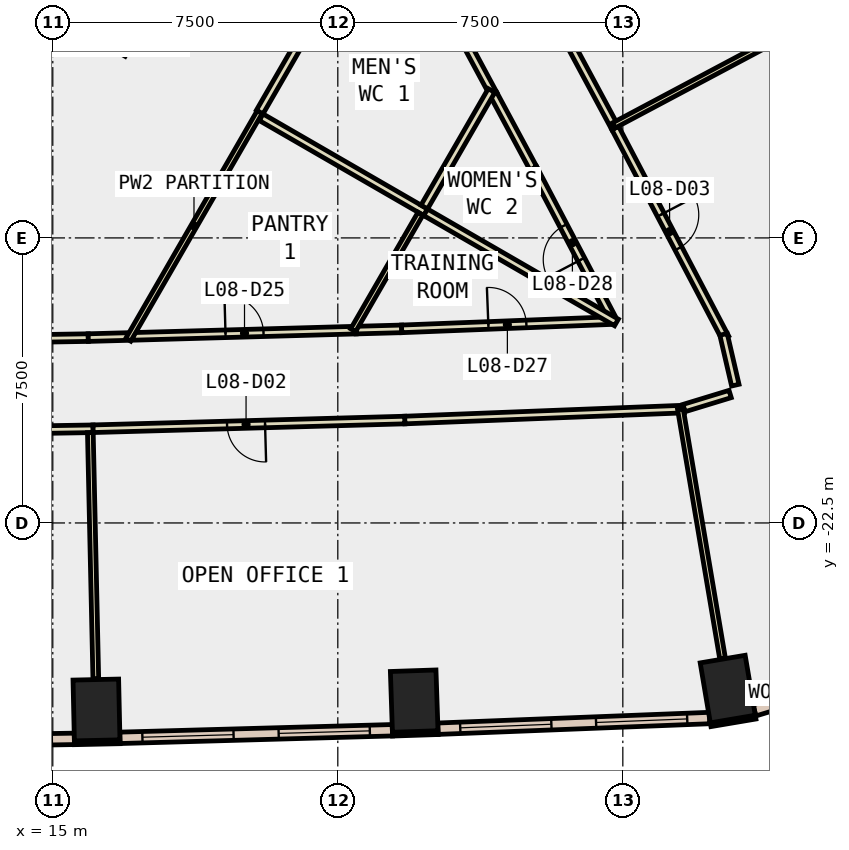
"""IFC4 building model, lengths in metres.
Left out: names, types, materials, properties, quantities, classifications, styles, units other than length and angle.
Written with IfcOpenShell. Run it as: python <this file> out.ifc"""

import sys

from ifc_helpers import new_model, si_unit, direction, frame, frame_2d, origin, origin_2d, place, context, subcontext, project, spatial, rectangle, extrude, element, fill, save


model = new_model("IFC4")
c1 = context("Model", 3, precision=1e-05, world=origin(), true_north=direction((0.0, 1.0)))
c2 = subcontext(c1, "Body", "Model", "MODEL_VIEW")
j1 = project(units=[si_unit("LENGTHUNIT", "METRE"), si_unit("PLANEANGLEUNIT", "RADIAN")], contexts=[c1])
p1 = place(None, origin())
s1 = spatial("IfcSite", under=j1, at=p1, CompositionType="ELEMENT")
p2 = place(p1, origin())
s2 = spatial("IfcBuilding", under=s1, at=p2, CompositionType="ELEMENT")
p3 = place(p2, frame((0.0, 0.0, 43.4)))
s3 = spatial("IfcBuildingStorey", under=s2, at=p3, CompositionType="ELEMENT", Elevation=43.4)
for number, where, z_axis, x_axis in (
    (1, (16.15, -27.421, -0.4), (0.0, 0.0, 1.0), (1.0, 0.022, 0.0)),
    (2, (24.51, -27.188, -0.4), (0.0, 0.0, 1.0), (0.999, 0.034, 0.0)),
    (3, (32.761, -26.871, -0.4), (0.0, 0.0, 1.0), (0.986, 0.167, 0.0)),
):
    element("IfcColumn", number, at=place(p3, frame(where, z_axis=z_axis, x_axis=x_axis)), inside=s3, PredefinedType="COLUMN", context=c2, shape_type="SweptSolid", body=[
        extrude(rectangle(XDim=1.2, YDim=1.6, at=origin_2d()), origin(), (0.0, 0.0, 1.0), 4.2),
    ])
p4 = place(p3, frame((9.31, -5.375, -0.4), z_axis=(0.0, 0.0, 1.0), x_axis=(0.866017533419, -0.500013631625, 0.0)))
e4 = element("IfcWall", 4, at=p4, inside=s3, PredefinedType="SHEAR", context=c2, shape_type="SweptSolid", body=[
    extrude(rectangle(XDim=9.0, YDim=0.8, at=frame_2d((4.5, 0.0))), origin(), (0.0, 0.0, 1.0), 4.2),
])
p5 = place(p3, frame((15.569, -28.284, 0.0), z_axis=(0.0, 0.0, 1.0), x_axis=(0.99976752127, 0.021561618973, 0.0)))
e5 = element("IfcWall", 5, at=p5, inside=s3, PredefinedType="STANDARD", context=c2, shape_type="SweptSolid", body=[
    extrude(rectangle(XDim=1.2, YDim=0.1, at=frame_2d((0.6, 0.0))), origin(), (0.0, 0.0, 1.0), 3.8),
])
for number, where, z_axis, x_axis in (
    (6, (23.939, -28.057, 0.0), (0.0, 0.0, 1.0), (0.999, 0.033, 0.0)),
    (7, (32.311, -27.809, 0.0), (0.0, 0.0, 1.0), (0.986, 0.167, 0.0)),
):
    element("IfcWall", number, at=place(p3, frame(where, z_axis=z_axis, x_axis=x_axis)), inside=s3, PredefinedType="STANDARD", context=c2, shape_type="SweptSolid", body=[
        extrude(rectangle(XDim=1.2, YDim=0.1, at=frame_2d((0.6, 0.0))), origin(), (0.0, 0.0, 1.0), 3.8),
    ])
p6 = place(p3, frame((8.398, -28.298, 0.0), z_axis=(0.0, 0.0, 1.0), x_axis=(0.999866467443, 0.016341581408, 0.0)))
e8 = element("IfcWall", 8, at=p6, inside=s3, PredefinedType="STANDARD", context=c2, shape_type="SweptSolid", body=[
    extrude(rectangle(XDim=7.171, YDim=0.3, at=frame_2d((3.585, 0.0))), origin(), (0.0, 0.0, 1.0), 3.8),
])
p7 = place(p6, frame((0.593, 0.0, 0.9)))
e9 = element("IfcOpeningElement", 9, at=p7, cuts=e8, PredefinedType="OPENING", context=c2, shape_type="SweptSolid", body=[
    extrude(rectangle(XDim=2.4, YDim=2.6, at=frame_2d((1.2, 1.3))), frame((0.0, 0.16, 0.0), z_axis=(0.0, -1.0, 0.0), x_axis=(1.0, 0.0, 0.0)), (0.0, 0.0, 1.0), 0.32),
])
p8 = place(p6, frame((4.178, 0.0, 0.9)))
e10 = element("IfcOpeningElement", 10, at=p8, cuts=e8, PredefinedType="OPENING", context=c2, shape_type="SweptSolid", body=[
    extrude(rectangle(XDim=2.4, YDim=2.6, at=frame_2d((1.2, 1.3))), frame((0.0, 0.16, 0.0), z_axis=(0.0, -1.0, 0.0), x_axis=(1.0, 0.0, 0.0)), (0.0, 0.0, 1.0), 0.32),
])
p9 = place(p3, frame((16.765, -28.154, 0.0), z_axis=(0.0, 0.0, 1.0), x_axis=(0.999611502654, 0.02787191709, 0.0)))
e11 = element("IfcWall", 11, at=p9, inside=s3, PredefinedType="STANDARD", context=c2, shape_type="SweptSolid", body=[
    extrude(rectangle(XDim=7.174, YDim=0.3, at=frame_2d((3.587, 0.0))), origin(), (0.0, 0.0, 1.0), 3.8),
])
p10 = place(p9, frame((0.593, 0.0, 0.9)))
e12 = element("IfcOpeningElement", 12, at=p10, cuts=e11, PredefinedType="OPENING", context=c2, shape_type="SweptSolid", body=[
    extrude(rectangle(XDim=2.4, YDim=2.6, at=frame_2d((1.2, 1.3))), frame((0.0, 0.16, 0.0), z_axis=(0.0, -1.0, 0.0), x_axis=(1.0, 0.0, 0.0)), (0.0, 0.0, 1.0), 0.32),
])
p11 = place(p9, frame((4.18, 0.0, 0.9)))
e13 = element("IfcOpeningElement", 13, at=p11, cuts=e11, PredefinedType="OPENING", context=c2, shape_type="SweptSolid", body=[
    extrude(rectangle(XDim=2.4, YDim=2.6, at=frame_2d((1.2, 1.3))), frame((0.0, 0.16, 0.0), z_axis=(0.0, -1.0, 0.0), x_axis=(1.0, 0.0, 0.0)), (0.0, 0.0, 1.0), 0.32),
])
p12 = place(p3, frame((25.134, -27.914, 0.0), z_axis=(0.0, 0.0, 1.0), x_axis=(0.999228146648, 0.039282450878, 0.0)))
e14 = element("IfcWall", 14, at=p12, inside=s3, PredefinedType="STANDARD", context=c2, shape_type="SweptSolid", body=[
    extrude(rectangle(XDim=7.154, YDim=0.3, at=frame_2d((3.577, 0.0))), origin(), (0.0, 0.0, 1.0), 3.8),
])
p13 = place(p12, frame((0.588, 0.0, 0.9)))
e15 = element("IfcOpeningElement", 15, at=p13, cuts=e14, PredefinedType="OPENING", context=c2, shape_type="SweptSolid", body=[
    extrude(rectangle(XDim=2.4, YDim=2.6, at=frame_2d((1.2, 1.3))), frame((0.0, 0.16, 0.0), z_axis=(0.0, -1.0, 0.0), x_axis=(1.0, 0.0, 0.0)), (0.0, 0.0, 1.0), 0.32),
])
p14 = place(p12, frame((4.165, 0.0, 0.9)))
e16 = element("IfcOpeningElement", 16, at=p14, cuts=e14, PredefinedType="OPENING", context=c2, shape_type="SweptSolid", body=[
    extrude(rectangle(XDim=2.4, YDim=2.6, at=frame_2d((1.2, 1.3))), frame((0.0, 0.16, 0.0), z_axis=(0.0, -1.0, 0.0), x_axis=(1.0, 0.0, 0.0)), (0.0, 0.0, 1.0), 0.32),
])
p15 = place(p3, frame((33.464, -27.433, 0.0), z_axis=(0.0, 0.0, 1.0), x_axis=(0.95648967224, 0.291766185322, 0.0)))
e17 = element("IfcWall", 17, at=p15, inside=s3, PredefinedType="STANDARD", context=c2, shape_type="SweptSolid", body=[
    extrude(rectangle(XDim=3.181, YDim=0.3, at=frame_2d((1.591, 0.0))), origin(), (0.0, 0.0, 1.0), 3.8),
])
p16 = place(p15, frame((0.891, 0.0, 0.9)))
e18 = element("IfcOpeningElement", 18, at=p16, cuts=e17, PredefinedType="OPENING", context=c2, shape_type="SweptSolid", body=[
    extrude(rectangle(XDim=1.4, YDim=2.6, at=frame_2d((0.7, 1.3))), frame((0.0, 0.16, 0.0), z_axis=(0.0, -1.0, 0.0), x_axis=(1.0, 0.0, 0.0)), (0.0, 0.0, 1.0), 0.32),
])
p17 = place(p3, frame((7.7, -17.758, 0.0), z_axis=(0.0, 0.0, 1.0), x_axis=(0.999865574926, 0.016396099485, 0.0)))
e19 = element("IfcWall", 19, at=p17, inside=s3, PredefinedType="PARTITIONING", context=c2, shape_type="SweptSolid", body=[
    extrude(rectangle(XDim=8.234, YDim=0.2, at=frame_2d((4.117, 0.0))), origin(), (0.0, 0.0, 1.0), 3.8),
])
p18 = place(p3, frame((15.933, -17.623, 0.0), z_axis=(0.0, 0.0, 1.0), x_axis=(0.999627129061, 0.027305729179, 0.0)))
e20 = element("IfcWall", 20, at=p18, inside=s3, PredefinedType="PARTITIONING", context=c2, shape_type="SweptSolid", body=[
    extrude(rectangle(XDim=1.028, YDim=0.2, at=frame_2d((0.514, 0.0))), origin(), (0.0, 0.0, 1.0), 3.8),
])
p19 = place(p3, frame((17.111, -17.591, 0.0), z_axis=(0.0, 0.0, 1.0), x_axis=(0.99960470841, 0.028114532261, 0.0)))
e21 = element("IfcWall", 21, at=p19, inside=s3, PredefinedType="PARTITIONING", context=c2, shape_type="SweptSolid", body=[
    extrude(rectangle(XDim=5.87, YDim=0.2, at=frame_2d((2.935, 0.0))), origin(), (0.0, 0.0, 1.0), 3.8),
])
p20 = place(p19, frame((2.435, 0.0, 0.0)))
e22 = element("IfcOpeningElement", 22, at=p20, cuts=e21, PredefinedType="OPENING", context=c2, shape_type="SweptSolid", body=[
    extrude(rectangle(XDim=1.0, YDim=2.1, at=frame_2d((0.5, 1.05))), frame((0.0, 0.11, 0.0), z_axis=(0.0, -1.0, 0.0), x_axis=(1.0, 0.0, 0.0)), (0.0, 0.0, 1.0), 0.22),
])
p21 = place(p3, frame((26.592, -11.211, 0.0), z_axis=(0.0, 0.0, 1.0), x_axis=(-0.473737860011, 0.880665907136, 0.0)))
e23 = element("IfcWall", 23, at=p21, inside=s3, PredefinedType="PARTITIONING", context=c2, shape_type="SweptSolid", body=[
    extrude(rectangle(XDim=4.988, YDim=0.2, at=frame_2d((2.494, 0.0))), origin(), (0.0, 0.0, 1.0), 3.8),
])
p22 = place(p21, frame((1.994, 0.0, 0.0)))
e24 = element("IfcOpeningElement", 24, at=p22, cuts=e23, PredefinedType="OPENING", context=c2, shape_type="SweptSolid", body=[
    extrude(rectangle(XDim=1.0, YDim=2.1, at=frame_2d((0.5, 1.05))), frame((0.0, 0.11, 0.0), z_axis=(0.0, -1.0, 0.0), x_axis=(1.0, 0.0, 0.0)), (0.0, 0.0, 1.0), 0.22),
])
p23 = place(p3, frame((22.979, -17.426, 0.0), z_axis=(0.0, 0.0, 1.0), x_axis=(0.999623609507, 0.027434272674, 0.0)))
e25 = element("IfcWall", 25, at=p23, inside=s3, PredefinedType="PARTITIONING", context=c2, shape_type="SweptSolid", body=[
    extrude(rectangle(XDim=1.201, YDim=0.2, at=frame_2d((0.601, 0.0))), origin(), (0.0, 0.0, 1.0), 3.8),
])
p24 = place(p3, frame((24.18, -17.393, 0.0), z_axis=(0.0, 0.0, 1.0), x_axis=(0.999226657848, 0.039320303228, 0.0)))
e26 = element("IfcWall", 26, at=p24, inside=s3, PredefinedType="PARTITIONING", context=c2, shape_type="SweptSolid", body=[
    extrude(rectangle(XDim=5.57, YDim=0.2, at=frame_2d((2.785, 0.0))), origin(), (0.0, 0.0, 1.0), 3.8),
])
p25 = place(p24, frame((2.284, 0.0, 0.0)))
e27 = element("IfcOpeningElement", 27, at=p25, cuts=e26, PredefinedType="OPENING", context=c2, shape_type="SweptSolid", body=[
    extrude(rectangle(XDim=1.0, YDim=2.1, at=frame_2d((0.5, 1.05))), frame((0.0, 0.11, 0.0), z_axis=(0.0, -1.0, 0.0), x_axis=(1.0, 0.0, 0.0)), (0.0, 0.0, 1.0), 0.22),
])
p26 = place(p3, frame((29.702, -17.085, 0.0), z_axis=(0.0, 0.0, 1.0), x_axis=(-0.464998228159, 0.88531161057, 0.0)))
e28 = element("IfcWall", 28, at=p26, inside=s3, PredefinedType="PARTITIONING", context=c2, shape_type="SweptSolid", body=[
    extrude(rectangle(XDim=4.426, YDim=0.2, at=frame_2d((2.213, 0.0))), origin(), (0.0, 0.0, 1.0), 3.8),
])
p27 = place(p26, frame((1.713, 0.0, 0.0)))
e29 = element("IfcOpeningElement", 29, at=p27, cuts=e28, PredefinedType="OPENING", context=c2, shape_type="SweptSolid", body=[
    extrude(rectangle(XDim=1.0, YDim=2.1, at=frame_2d((0.5, 1.05))), frame((0.0, 0.11, 0.0), z_axis=(0.0, -1.0, 0.0), x_axis=(1.0, 0.0, 0.0)), (0.0, 0.0, 1.0), 0.22),
])
p28 = place(p3, frame((27.644, -13.167, 0.0), z_axis=(0.0, 0.0, 1.0), x_axis=(-0.473660574093, 0.880707477287, 0.0)))
e30 = element("IfcWall", 30, at=p28, inside=s3, PredefinedType="PARTITIONING", context=c2, shape_type="SweptSolid", body=[
    extrude(rectangle(XDim=2.221, YDim=0.2, at=frame_2d((1.11, 0.0))), origin(), (0.0, 0.0, 1.0), 3.8),
])
p29 = place(p3, frame((16.061, -20.022, 0.0), z_axis=(0.0, 0.0, 1.0), x_axis=(-0.999865858466, -0.016378799504, 0.0)))
e31 = element("IfcWall", 31, at=p29, inside=s3, PredefinedType="PARTITIONING", context=c2, shape_type="SweptSolid", body=[
    extrude(rectangle(XDim=8.362, YDim=0.2, at=frame_2d((4.181, 0.0))), origin(), (0.0, 0.0, 1.0), 3.8),
])
p30 = place(p29, frame((3.681, 0.0, 0.0)))
e32 = element("IfcOpeningElement", 32, at=p30, cuts=e31, PredefinedType="OPENING", context=c2, shape_type="SweptSolid", body=[
    extrude(rectangle(XDim=1.0, YDim=2.1, at=frame_2d((0.5, 1.05))), frame((0.0, 0.11, 0.0), z_axis=(0.0, -1.0, 0.0), x_axis=(1.0, 0.0, 0.0)), (0.0, 0.0, 1.0), 0.22),
])
p31 = place(p3, frame((31.615, -19.503, 0.0), z_axis=(0.0, 0.0, 1.0), x_axis=(-0.999228381006, -0.039276489048, 0.0)))
e33 = element("IfcWall", 33, at=p31, inside=s3, PredefinedType="PARTITIONING", context=c2, shape_type="SweptSolid", body=[
    extrude(rectangle(XDim=7.36, YDim=0.2, at=frame_2d((3.68, 0.0))), origin(), (0.0, 0.0, 1.0), 3.8),
])
p32 = place(p3, frame((24.261, -19.792, 0.0), z_axis=(0.0, 0.0, 1.0), x_axis=(-0.999610256124, -0.027916587377, 0.0)))
e34 = element("IfcWall", 34, at=p32, inside=s3, PredefinedType="PARTITIONING", context=c2, shape_type="SweptSolid", body=[
    extrude(rectangle(XDim=8.203, YDim=0.2, at=frame_2d((4.102, 0.0))), origin(), (0.0, 0.0, 1.0), 3.8),
])
p33 = place(p32, frame((3.677, 0.0, 0.0)))
e35 = element("IfcOpeningElement", 35, at=p33, cuts=e34, PredefinedType="OPENING", context=c2, shape_type="SweptSolid", body=[
    extrude(rectangle(XDim=1.0, YDim=2.1, at=frame_2d((0.5, 1.05))), frame((0.0, 0.11, 0.0), z_axis=(0.0, -1.0, 0.0), x_axis=(1.0, 0.0, 0.0)), (0.0, 0.0, 1.0), 0.22),
])
p34 = place(p3, frame((29.799, -12.107, 0.0), z_axis=(0.0, 0.0, 1.0), x_axis=(0.464767882002, -0.885432558617, 0.0)))
e36 = element("IfcWall", 36, at=p34, inside=s3, PredefinedType="PARTITIONING", context=c2, shape_type="SweptSolid", body=[
    extrude(rectangle(XDim=6.233, YDim=0.2, at=frame_2d((3.117, 0.0))), origin(), (0.0, 0.0, 1.0), 3.8),
])
p35 = place(p34, frame((2.58, 0.0, 0.0)))
e37 = element("IfcOpeningElement", 37, at=p35, cuts=e36, PredefinedType="OPENING", context=c2, shape_type="SweptSolid", body=[
    extrude(rectangle(XDim=1.0, YDim=2.1, at=frame_2d((0.5, 1.05))), frame((0.0, 0.11, 0.0), z_axis=(0.0, -1.0, 0.0), x_axis=(1.0, 0.0, 0.0)), (0.0, 0.0, 1.0), 0.22),
])
p36 = place(p3, frame((32.65, -17.538, 0.0), z_axis=(0.0, 0.0, 1.0), x_axis=(0.226081445763, -0.974108402531, 0.0)))
e38 = element("IfcWall", 38, at=p36, inside=s3, PredefinedType="PARTITIONING", context=c2, shape_type="SweptSolid", body=[
    extrude(rectangle(XDim=1.371, YDim=0.2, at=frame_2d((0.686, 0.0))), origin(), (0.0, 0.0, 1.0), 3.8),
])
p37 = place(p3, frame((32.824, -19.107, 0.0), z_axis=(0.0, 0.0, 1.0), x_axis=(-0.956459113118, -0.291866347723, 0.0)))
e39 = element("IfcWall", 39, at=p37, inside=s3, PredefinedType="PARTITIONING", context=c2, shape_type="SweptSolid", body=[
    extrude(rectangle(XDim=1.268, YDim=0.2, at=frame_2d((0.634, 0.0))), origin(), (0.0, 0.0, 1.0), 3.8),
])
p38 = place(p3, frame((26.337, -5.671, 0.0), z_axis=(0.0, 0.0, 1.0), x_axis=(0.473794961698, -0.880635187958, 0.0)))
e40 = element("IfcWall", 40, at=p38, inside=s3, PredefinedType="PARTITIONING", context=c2, shape_type="SweptSolid", body=[
    extrude(rectangle(XDim=7.307, YDim=0.2, at=frame_2d((3.654, 0.0))), origin(), (0.0, 0.0, 1.0), 3.8),
])
p39 = place(p38, frame((3.154, 0.0, 0.0)))
e41 = element("IfcOpeningElement", 41, at=p39, cuts=e40, PredefinedType="OPENING", context=c2, shape_type="SweptSolid", body=[
    extrude(rectangle(XDim=1.0, YDim=2.1, at=frame_2d((0.5, 1.05))), frame((0.0, 0.11, 0.0), z_axis=(0.0, -1.0, 0.0), x_axis=(1.0, 0.0, 0.0)), (0.0, 0.0, 1.0), 0.22),
])
p40 = place(p3, frame((20.445, -11.688, 0.0), z_axis=(0.0, 0.0, 1.0), x_axis=(-0.500010633597, -0.866019264387, 0.0)))
e42 = element("IfcWall", 42, at=p40, inside=s3, PredefinedType="PARTITIONING", context=c2, shape_type="SweptSolid", body=[
    extrude(rectangle(XDim=6.918, YDim=0.15, at=frame_2d((3.459, 0.0))), origin(), (0.0, 0.0, 1.0), 3.8),
])
p41 = place(p3, frame((22.857, -7.51, 0.0), z_axis=(0.0, 0.0, 1.0), x_axis=(-0.499954636112, -0.866051593054, 0.0)))
e43 = element("IfcWall", 43, at=p41, inside=s3, PredefinedType="PARTITIONING", context=c2, shape_type="SweptSolid", body=[
    extrude(rectangle(XDim=4.824, YDim=0.2, at=frame_2d((2.412, 0.0))), origin(), (0.0, 0.0, 1.0), 3.8),
])
p42 = place(p3, frame((20.482, -11.824, 0.0), z_axis=(0.0, 0.0, 1.0), x_axis=(0.866022959057, -0.500004234368, 0.0)))
e44 = element("IfcWall", 44, at=p42, inside=s3, PredefinedType="PARTITIONING", context=c2, shape_type="SweptSolid", body=[
    extrude(rectangle(XDim=5.0, YDim=0.2, at=frame_2d((2.5, 0.0))), origin(), (0.0, 0.0, 1.0), 3.8),
])
p43 = place(p3, frame((24.675, -14.362, 0.0), z_axis=(0.0, 0.0, 1.0), x_axis=(-0.500187988959, -0.865916841101, 0.0)))
e45 = element("IfcWall", 45, at=p43, inside=s3, PredefinedType="PARTITIONING", context=c2, shape_type="SweptSolid", body=[
    extrude(rectangle(XDim=3.541, YDim=0.15, at=frame_2d((1.771, 0.0))), origin(), (0.0, 0.0, 1.0), 3.8),
])
p44 = place(p3, frame((26.545, -11.123, 0.0), z_axis=(0.0, 0.0, 1.0), x_axis=(-0.500100605862, -0.865967311171, 0.0)))
e46 = element("IfcWall", 46, at=p44, inside=s3, PredefinedType="PARTITIONING", context=c2, shape_type="SweptSolid", body=[
    extrude(rectangle(XDim=3.539, YDim=0.2, at=frame_2d((1.77, 0.0))), origin(), (0.0, 0.0, 1.0), 3.8),
])
p45 = place(p3, frame((24.811, -14.326, 0.0), z_axis=(0.0, 0.0, 1.0), x_axis=(0.866076195524, -0.499912015806, 0.0)))
e47 = element("IfcWall", 47, at=p45, inside=s3, PredefinedType="PARTITIONING", context=c2, shape_type="SweptSolid", body=[
    extrude(rectangle(XDim=5.797, YDim=0.2, at=frame_2d((2.899, 0.0))), origin(), (0.0, 0.0, 1.0), 3.8),
])
p46 = place(p3, frame((15.988, -20.123, 0.0), z_axis=(0.0, 0.0, 1.0), x_axis=(0.022230127358, -0.999752880185, 0.0)))
e48 = element("IfcWall", 48, at=p46, inside=s3, PredefinedType="PARTITIONING", context=c2, shape_type="SweptSolid", body=[
    extrude(rectangle(XDim=6.48, YDim=0.15, at=frame_2d((3.24, 0.0))), origin(), (0.0, 0.0, 1.0), 3.8),
])
p47 = place(p3, frame((31.515, -19.506, 0.0), z_axis=(0.0, 0.0, 1.0), x_axis=(0.166785823947, -0.985993148521, 0.0)))
e49 = element("IfcWall", 49, at=p47, inside=s3, PredefinedType="PARTITIONING", context=c2, shape_type="SweptSolid", body=[
    extrude(rectangle(XDim=6.65, YDim=0.15, at=frame_2d((3.325, 0.0))), origin(), (0.0, 0.0, 1.0), 3.8),
])
p48 = place(p3, frame((29.764, -12.04, 0.0), z_axis=(0.0, 0.0, 1.0), x_axis=(0.883018657393, 0.469337885426, 0.0)))
e50 = element("IfcWall", 50, at=p48, inside=s3, PredefinedType="PARTITIONING", context=c2, shape_type="SweptSolid", body=[
    extrude(rectangle(XDim=6.58, YDim=0.15, at=frame_2d((3.29, 0.0))), origin(), (0.0, 0.0, 1.0), 3.8),
])
p49 = place(p10, origin())
e51 = element("IfcWindow", 51, at=p49, inside=s3, PartitioningType="SINGLE_PANEL", PredefinedType="WINDOW", context=c2, shape_type="SweptSolid", body=[
    extrude(rectangle(XDim=2.4, YDim=2.6, at=frame_2d((1.2, 1.3))), frame((0.0, 0.03, 0.0), z_axis=(0.0, -1.0, 0.0), x_axis=(1.0, 0.0, 0.0)), (0.0, 0.0, 1.0), 0.06),
])
fill(e12, e51)
p50 = place(p11, origin())
e52 = element("IfcWindow", 52, at=p50, inside=s3, PartitioningType="SINGLE_PANEL", PredefinedType="WINDOW", context=c2, shape_type="SweptSolid", body=[
    extrude(rectangle(XDim=2.4, YDim=2.6, at=frame_2d((1.2, 1.3))), frame((0.0, 0.03, 0.0), z_axis=(0.0, -1.0, 0.0), x_axis=(1.0, 0.0, 0.0)), (0.0, 0.0, 1.0), 0.06),
])
fill(e13, e52)
p51 = place(p13, origin())
e53 = element("IfcWindow", 53, at=p51, inside=s3, PartitioningType="SINGLE_PANEL", PredefinedType="WINDOW", context=c2, shape_type="SweptSolid", body=[
    extrude(rectangle(XDim=2.4, YDim=2.6, at=frame_2d((1.2, 1.3))), frame((0.0, 0.03, 0.0), z_axis=(0.0, -1.0, 0.0), x_axis=(1.0, 0.0, 0.0)), (0.0, 0.0, 1.0), 0.06),
])
fill(e15, e53)
p52 = place(p14, origin())
e54 = element("IfcWindow", 54, at=p52, inside=s3, PartitioningType="SINGLE_PANEL", PredefinedType="WINDOW", context=c2, shape_type="SweptSolid", body=[
    extrude(rectangle(XDim=2.4, YDim=2.6, at=frame_2d((1.2, 1.3))), frame((0.0, 0.03, 0.0), z_axis=(0.0, -1.0, 0.0), x_axis=(1.0, 0.0, 0.0)), (0.0, 0.0, 1.0), 0.06),
])
fill(e16, e54)
p53 = place(p33, origin())
e55 = element("IfcDoor", 55, at=p53, inside=s3, OperationType="SINGLE_SWING_RIGHT", PredefinedType="DOOR", context=c2, shape_type="SweptSolid", body=[
    extrude(rectangle(XDim=1.0, YDim=2.1, at=frame_2d((0.5, 1.05))), frame((0.0, 0.025, 0.0), z_axis=(0.0, -1.0, 0.0), x_axis=(1.0, 0.0, 0.0)), (0.0, 0.0, 1.0), 0.05),
])
fill(e35, e55)
p54 = place(p35, origin())
e56 = element("IfcDoor", 56, at=p54, inside=s3, OperationType="SINGLE_SWING_LEFT", PredefinedType="DOOR", context=c2, shape_type="SweptSolid", body=[
    extrude(rectangle(XDim=1.0, YDim=2.1, at=frame_2d((0.5, 1.05))), frame((0.0, 0.025, 0.0), z_axis=(0.0, -1.0, 0.0), x_axis=(1.0, 0.0, 0.0)), (0.0, 0.0, 1.0), 0.05),
])
fill(e37, e56)
p55 = place(p20, origin())
e57 = element("IfcDoor", 57, at=p55, inside=s3, OperationType="SINGLE_SWING_LEFT", PredefinedType="DOOR", context=c2, shape_type="SweptSolid", body=[
    extrude(rectangle(XDim=1.0, YDim=2.1, at=frame_2d((0.5, 1.05))), frame((0.0, 0.025, 0.0), z_axis=(0.0, -1.0, 0.0), x_axis=(1.0, 0.0, 0.0)), (0.0, 0.0, 1.0), 0.05),
])
fill(e22, e57)
p56 = place(p25, origin())
e58 = element("IfcDoor", 58, at=p56, inside=s3, OperationType="SINGLE_SWING_LEFT", PredefinedType="DOOR", context=c2, shape_type="SweptSolid", body=[
    extrude(rectangle(XDim=1.0, YDim=2.1, at=frame_2d((0.5, 1.05))), frame((0.0, 0.025, 0.0), z_axis=(0.0, -1.0, 0.0), x_axis=(1.0, 0.0, 0.0)), (0.0, 0.0, 1.0), 0.05),
])
fill(e27, e58)
p57 = place(p27, origin())
e59 = element("IfcDoor", 59, at=p57, inside=s3, OperationType="SINGLE_SWING_LEFT", PredefinedType="DOOR", context=c2, shape_type="SweptSolid", body=[
    extrude(rectangle(XDim=1.0, YDim=2.1, at=frame_2d((0.5, 1.05))), frame((0.0, 0.025, 0.0), z_axis=(0.0, -1.0, 0.0), x_axis=(1.0, 0.0, 0.0)), (0.0, 0.0, 1.0), 0.05),
])
fill(e29, e59)
save(model, sys.argv[1])
